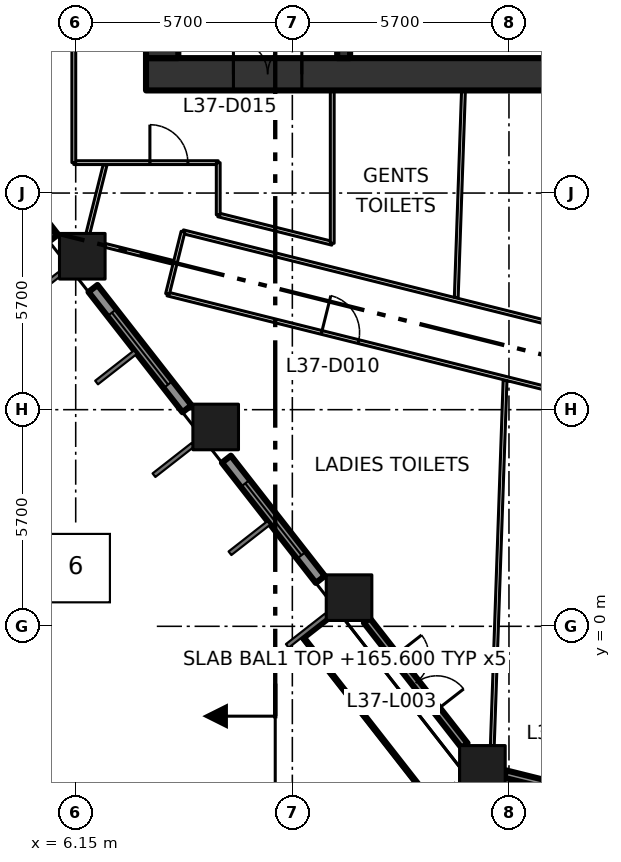
"""IFC4 building model, lengths in metres.
Left out: names, types, materials, properties, quantities, classifications, styles, units other than length and angle.
Written with IfcOpenShell. Run it as: python <this file> out.ifc"""

import sys

from ifc_helpers import new_model, si_unit, direction, frame, frame_2d, origin, origin_2d, place, context, subcontext, project, spatial, rectangle, extrude, element, fill, save


model = new_model("IFC4")
c1 = context("Model", 3, precision=1e-05, world=origin(), true_north=direction((0.0, 1.0)))
c2 = subcontext(c1, "Body", "Model", "MODEL_VIEW")
j1 = project(units=[si_unit("LENGTHUNIT", "METRE"), si_unit("PLANEANGLEUNIT", "RADIAN")], contexts=[c1])
p1 = place(None, origin())
s1 = spatial("IfcSite", under=j1, at=p1, CompositionType="ELEMENT")
p2 = place(p1, origin())
s2 = spatial("IfcBuilding", under=s1, at=p2, CompositionType="ELEMENT")
p3 = place(p2, frame((0.0, 0.0, 165.6)))
s3 = spatial("IfcBuildingStorey", under=s2, at=p3, CompositionType="ELEMENT", Elevation=165.6)
for number, where, z_axis, x_axis in (
    (1, (16.851, -3.738, 0.0), (0.0, 0.0, 1.0), (1.0, 0.0, 0.0)),
    (2, (13.342, 0.754, 0.0), (0.0, 0.0, 1.0), (1.0, 0.0, 0.0)),
    (3, (9.833, 5.245, 0.0), (0.0, 0.0, 1.0), (1.0, 0.0, 0.0)),
    (4, (6.323, 9.737, 0.0), (0.0, 0.0, 1.0), (1.0, 0.0, 0.0)),
):
    element("IfcColumn", number, at=place(p3, frame(where, z_axis=z_axis, x_axis=x_axis)), inside=s3, PredefinedType="COLUMN", context=c2, shape_type="SweptSolid", body=[
        extrude(rectangle(XDim=1.2, YDim=1.2, at=origin_2d()), origin(), (0.0, 0.0, 1.0), 4.2),
    ])
p4 = place(p3, frame((8.0, 14.525, -0.3), z_axis=(0.0, 0.0, 1.0), x_axis=(1.0, 0.0, 0.0)))
e5 = element("IfcWall", 5, at=p4, inside=s3, PredefinedType="SHEAR", context=c2, shape_type="SweptSolid", body=[
    extrude(rectangle(XDim=22.8, YDim=0.85, at=frame_2d((11.4, 0.0))), origin(), (0.0, 0.0, 1.0), 4.2),
])
p5 = place(p4, frame((2.3, 0.0, 0.3)))
e6 = element("IfcOpeningElement", 6, at=p5, cuts=e5, PredefinedType="OPENING", context=c2, shape_type="SweptSolid", body=[
    extrude(rectangle(XDim=1.8, YDim=2.1, at=frame_2d((0.9, 1.05))), frame((0.0, 0.435, 0.0), z_axis=(0.0, -1.0, 0.0), x_axis=(1.0, 0.0, 0.0)), (0.0, 0.0, 1.0), 0.87),
])
p6 = place(p3, frame((8.425, 14.95, -0.3), z_axis=(0.0, 0.0, 1.0), x_axis=(0.0, 1.0, 0.0)))
e7 = element("IfcWall", 7, at=p6, inside=s3, PredefinedType="SHEAR", context=c2, shape_type="SweptSolid", body=[
    extrude(rectangle(XDim=20.75, YDim=0.85, at=frame_2d((10.375, 0.0))), origin(), (0.0, 0.0, 1.0), 4.2),
])
p7 = place(p3, frame((13.2, 14.95, 0.0), z_axis=(0.0, 0.0, 1.0), x_axis=(0.0, 1.0, 0.0)))
e8 = element("IfcWall", 8, at=p7, inside=s3, PredefinedType="SHEAR", context=c2, shape_type="SweptSolid", body=[
    extrude(rectangle(XDim=20.75, YDim=0.34, at=frame_2d((10.375, 0.0))), origin(), (0.0, 0.0, 1.0), 3.9),
])
p8 = place(p7, frame((3.35, 0.0, 0.0)))
e9 = element("IfcOpeningElement", 9, at=p8, cuts=e8, PredefinedType="OPENING", context=c2, shape_type="SweptSolid", body=[
    extrude(rectangle(XDim=1.8, YDim=2.1, at=frame_2d((0.9, 1.05))), frame((0.0, 0.18, 0.0), z_axis=(0.0, -1.0, 0.0), x_axis=(1.0, 0.0, 0.0)), (0.0, 0.0, 1.0), 0.36),
])
p9 = place(p7, frame((11.45, 0.0, 0.0)))
e10 = element("IfcOpeningElement", 10, at=p9, cuts=e8, PredefinedType="OPENING", context=c2, shape_type="SweptSolid", body=[
    extrude(rectangle(XDim=1.2, YDim=2.1, at=frame_2d((0.6, 1.05))), frame((0.0, 0.18, 0.0), z_axis=(0.0, -1.0, 0.0), x_axis=(1.0, 0.0, 0.0)), (0.0, 0.0, 1.0), 0.36),
])
p10 = place(p3, frame((3.096, 13.381, 0.0), z_axis=(0.0, 0.0, 1.0), x_axis=(0.615563820493, -0.78808704018, 0.0)))
e11 = element("IfcWall", 11, at=p10, inside=s3, PredefinedType="SOLIDWALL", context=c2, shape_type="SweptSolid", body=[
    extrude(rectangle(XDim=4.016, YDim=0.3, at=frame_2d((2.008, 0.0))), origin(), (0.0, 0.0, 1.0), 3.15),
])
p11 = place(p10, frame((0.808, 0.0, 0.8)))
e12 = element("IfcOpeningElement", 12, at=p11, cuts=e11, PredefinedType="OPENING", context=c2, shape_type="SweptSolid", body=[
    extrude(rectangle(XDim=2.4, YDim=2.1, at=frame_2d((1.2, 1.05))), frame((0.0, 0.16, 0.0), z_axis=(0.0, -1.0, 0.0), x_axis=(1.0, 0.0, 0.0)), (0.0, 0.0, 1.0), 0.32),
])
p12 = place(p3, frame((6.605, 8.889, 0.0), z_axis=(0.0, 0.0, 1.0), x_axis=(0.615706559089, -0.787975528233, 0.0)))
e13 = element("IfcWall", 13, at=p12, inside=s3, PredefinedType="SOLIDWALL", context=c2, shape_type="SweptSolid", body=[
    extrude(rectangle(XDim=4.016, YDim=0.3, at=frame_2d((2.008, 0.0))), origin(), (0.0, 0.0, 1.0), 3.15),
])
p13 = place(p12, frame((0.808, 0.0, 0.8)))
e14 = element("IfcOpeningElement", 14, at=p13, cuts=e13, PredefinedType="OPENING", context=c2, shape_type="SweptSolid", body=[
    extrude(rectangle(XDim=2.4, YDim=2.1, at=frame_2d((1.2, 1.05))), frame((0.0, 0.16, 0.0), z_axis=(0.0, -1.0, 0.0), x_axis=(1.0, 0.0, 0.0)), (0.0, 0.0, 1.0), 0.32),
])
p14 = place(p3, frame((10.115, 4.397, 0.0), z_axis=(0.0, 0.0, 1.0), x_axis=(0.615644041972, -0.788024373725, 0.0)))
e15 = element("IfcWall", 15, at=p14, inside=s3, PredefinedType="SOLIDWALL", context=c2, shape_type="SweptSolid", body=[
    extrude(rectangle(XDim=4.015, YDim=0.3, at=frame_2d((2.008, 0.0))), origin(), (0.0, 0.0, 1.0), 3.15),
])
p15 = place(p14, frame((0.807, 0.0, 0.8)))
e16 = element("IfcOpeningElement", 16, at=p15, cuts=e15, PredefinedType="OPENING", context=c2, shape_type="SweptSolid", body=[
    extrude(rectangle(XDim=2.4, YDim=2.1, at=frame_2d((1.2, 1.05))), frame((0.0, 0.16, 0.0), z_axis=(0.0, -1.0, 0.0), x_axis=(1.0, 0.0, 0.0)), (0.0, 0.0, 1.0), 0.32),
])
p16 = place(p3, frame((13.811, 0.154, 0.0), z_axis=(0.0, 0.0, 1.0), x_axis=(0.615521537177, -0.788120065264, 0.0)))
e17 = element("IfcWall", 17, at=p16, inside=s3, PredefinedType="SOLIDWALL", context=c2, shape_type="SweptSolid", body=[
    extrude(rectangle(XDim=4.177, YDim=0.2, at=frame_2d((2.088, 0.0))), origin(), (0.0, 0.0, 1.0), 3.15),
])
p17 = place(p16, frame((1.188, 0.0, 0.0)))
e18 = element("IfcOpeningElement", 18, at=p17, cuts=e17, PredefinedType="OPENING", context=c2, shape_type="SweptSolid", body=[
    extrude(rectangle(XDim=1.8, YDim=2.9, at=frame_2d((0.9, 1.45))), frame((0.0, 0.11, 0.0), z_axis=(0.0, -1.0, 0.0), x_axis=(1.0, 0.0, 0.0)), (0.0, 0.0, 1.0), 0.22),
])
p18 = place(p3, frame((12.398, -0.199, 0.0), z_axis=(0.0, 0.0, 1.0), x_axis=(0.615638738903, -0.788028516719, 0.0)))
e19 = element("IfcWall", 19, at=p18, inside=s3, PredefinedType="SOLIDWALL", context=c2, shape_type="SweptSolid", body=[
    extrude(rectangle(XDim=5.36, YDim=0.4, at=frame_2d((2.68, 0.0))), origin(), (0.0, 0.0, 1.0), 0.3),
])
p19 = place(p3, frame((17.451, -3.888, 0.0), z_axis=(0.0, 0.0, 1.0), x_axis=(0.970335243139, -0.241763346938, 0.0)))
e20 = element("IfcWall", 20, at=p19, inside=s3, PredefinedType="SOLIDWALL", context=c2, shape_type="SweptSolid", body=[
    extrude(rectangle(XDim=4.463, YDim=0.2, at=frame_2d((2.232, 0.0))), origin(), (0.0, 0.0, 1.0), 3.15),
])
p20 = place(p19, frame((1.331, 0.0, 0.0)))
e21 = element("IfcOpeningElement", 21, at=p20, cuts=e20, PredefinedType="OPENING", context=c2, shape_type="SweptSolid", body=[
    extrude(rectangle(XDim=1.8, YDim=2.9, at=frame_2d((0.9, 1.45))), frame((0.0, 0.11, 0.0), z_axis=(0.0, -1.0, 0.0), x_axis=(1.0, 0.0, 0.0)), (0.0, 0.0, 1.0), 0.22),
])
p21 = place(p3, frame((6.1, 12.2, 0.0), z_axis=(0.0, 0.0, 1.0), x_axis=(1.0, 0.0, 0.0)))
e22 = element("IfcWall", 22, at=p21, inside=s3, PredefinedType="PARTITIONING", context=c2, shape_type="SweptSolid", body=[
    extrude(rectangle(XDim=3.8, YDim=0.1, at=frame_2d((1.9, 0.0))), origin(), (0.0, 0.0, 1.0), 3.9),
])
p22 = place(p21, frame((2.002, 0.0, 0.0)))
e23 = element("IfcOpeningElement", 23, at=p22, cuts=e22, PredefinedType="OPENING", context=c2, shape_type="SweptSolid", body=[
    extrude(rectangle(XDim=1.0, YDim=2.1, at=frame_2d((0.5, 1.05))), frame((0.0, 0.06, 0.0), z_axis=(0.0, -1.0, 0.0), x_axis=(1.0, 0.0, 0.0)), (0.0, 0.0, 1.0), 0.12),
])
p23 = place(p3, frame((6.1, 38.9, 0.0), z_axis=(0.0, 0.0, 1.0), x_axis=(0.0, -1.0, 0.0)))
e24 = element("IfcWall", 24, at=p23, inside=s3, PredefinedType="PARTITIONING", context=c2, shape_type="SweptSolid", body=[
    extrude(rectangle(XDim=26.7, YDim=0.1, at=frame_2d((13.35, 0.0))), origin(), (0.0, 0.0, 1.0), 3.9),
])
p24 = place(p23, frame((20.61, 0.0, 0.0)))
e25 = element("IfcOpeningElement", 25, at=p24, cuts=e24, PredefinedType="OPENING", context=c2, shape_type="SweptSolid", body=[
    extrude(rectangle(XDim=1.0, YDim=2.1, at=frame_2d((0.5, 1.05))), frame((0.0, 0.06, 0.0), z_axis=(0.0, -1.0, 0.0), x_axis=(1.0, 0.0, 0.0)), (0.0, 0.0, 1.0), 0.12),
])
p25 = place(p23, frame((7.18, 0.0, 0.0)))
e26 = element("IfcOpeningElement", 26, at=p25, cuts=e24, PredefinedType="OPENING", context=c2, shape_type="SweptSolid", body=[
    extrude(rectangle(XDim=1.8, YDim=2.1, at=frame_2d((0.9, 1.05))), frame((0.0, 0.06, 0.0), z_axis=(0.0, -1.0, 0.0), x_axis=(1.0, 0.0, 0.0)), (0.0, 0.0, 1.0), 0.12),
])
p26 = place(p3, frame((8.565, 8.744, 0.0), z_axis=(0.0, 0.0, 1.0), x_axis=(0.970296742948, -0.241917817915, 0.0)))
e27 = element("IfcWall", 27, at=p26, inside=s3, PredefinedType="PARTITIONING", context=c2, shape_type="SweptSolid", body=[
    extrude(rectangle(XDim=57.374, YDim=0.1, at=frame_2d((28.687, 0.0))), origin(), (0.0, 0.0, 1.0), 3.9),
])
p27 = place(p26, frame((46.936, 0.0, 0.0)))
e28 = element("IfcOpeningElement", 28, at=p27, cuts=e27, PredefinedType="OPENING", context=c2, shape_type="SweptSolid", body=[
    extrude(rectangle(XDim=1.0, YDim=2.1, at=frame_2d((0.5, 1.05))), frame((0.0, 0.06, 0.0), z_axis=(0.0, -1.0, 0.0), x_axis=(1.0, 0.0, 0.0)), (0.0, 0.0, 1.0), 0.12),
])
p28 = place(p26, frame((13.936, 0.0, 0.0)))
e29 = element("IfcOpeningElement", 29, at=p28, cuts=e27, PredefinedType="OPENING", context=c2, shape_type="SweptSolid", body=[
    extrude(rectangle(XDim=1.0, YDim=2.1, at=frame_2d((0.5, 1.05))), frame((0.0, 0.06, 0.0), z_axis=(0.0, -1.0, 0.0), x_axis=(1.0, 0.0, 0.0)), (0.0, 0.0, 1.0), 0.12),
])
p29 = place(p26, frame((18.736, 0.0, 0.0)))
e30 = element("IfcOpeningElement", 30, at=p29, cuts=e27, PredefinedType="OPENING", context=c2, shape_type="SweptSolid", body=[
    extrude(rectangle(XDim=1.8, YDim=2.1, at=frame_2d((0.9, 1.05))), frame((0.0, 0.06, 0.0), z_axis=(0.0, -1.0, 0.0), x_axis=(1.0, 0.0, 0.0)), (0.0, 0.0, 1.0), 0.12),
])
p30 = place(p26, frame((31.036, 0.0, 0.0)))
e31 = element("IfcOpeningElement", 31, at=p30, cuts=e27, PredefinedType="OPENING", context=c2, shape_type="SweptSolid", body=[
    extrude(rectangle(XDim=1.8, YDim=2.1, at=frame_2d((0.9, 1.05))), frame((0.0, 0.06, 0.0), z_axis=(0.0, -1.0, 0.0), x_axis=(1.0, 0.0, 0.0)), (0.0, 0.0, 1.0), 0.12),
])
p31 = place(p26, frame((4.18, 0.0, 0.0)))
e32 = element("IfcOpeningElement", 32, at=p31, cuts=e27, PredefinedType="OPENING", context=c2, shape_type="SweptSolid", body=[
    extrude(rectangle(XDim=1.0, YDim=2.1, at=frame_2d((0.5, 1.05))), frame((0.0, 0.06, 0.0), z_axis=(0.0, -1.0, 0.0), x_axis=(1.0, 0.0, 0.0)), (0.0, 0.0, 1.0), 0.12),
])
p32 = place(p3, frame((8.973, 10.382, 0.0), z_axis=(0.0, 0.0, 1.0), x_axis=(0.970286808807, -0.241957658808, 0.0)))
e33 = element("IfcWall", 33, at=p32, inside=s3, PredefinedType="PARTITIONING", context=c2, shape_type="SweptSolid", body=[
    extrude(rectangle(XDim=19.88, YDim=0.1, at=frame_2d((9.94, 0.0))), origin(), (0.0, 0.0, 1.0), 3.9),
])
p33 = place(p32, frame((12.575, 0.0, 0.0)))
e34 = element("IfcOpeningElement", 34, at=p33, cuts=e33, PredefinedType="OPENING", context=c2, shape_type="SweptSolid", body=[
    extrude(rectangle(XDim=1.8, YDim=2.1, at=frame_2d((0.9, 1.05))), frame((0.0, 0.06, 0.0), z_axis=(0.0, -1.0, 0.0), x_axis=(1.0, 0.0, 0.0)), (0.0, 0.0, 1.0), 0.12),
])
p34 = place(p3, frame((8.973, 10.382, 0.0), z_axis=(0.0, 0.0, 1.0), x_axis=(-0.241650823739, -0.970363271866, 0.0)))
e35 = element("IfcWall", 35, at=p34, inside=s3, PredefinedType="PARTITIONING", context=c2, shape_type="SweptSolid", body=[
    extrude(rectangle(XDim=1.688, YDim=0.1, at=frame_2d((0.844, 0.0))), origin(), (0.0, 0.0, 1.0), 3.9),
])
p35 = place(p3, frame((9.9, 10.826, 0.0), z_axis=(0.0, 0.0, 1.0), x_axis=(0.970290953223, -0.241941038466, 0.0)))
e36 = element("IfcWall", 36, at=p35, inside=s3, PredefinedType="PARTITIONING", context=c2, shape_type="SweptSolid", body=[
    extrude(rectangle(XDim=3.092, YDim=0.1, at=frame_2d((1.546, 0.0))), origin(), (0.0, 0.0, 1.0), 3.9),
])
p36 = place(p3, frame((9.9, 12.2, 0.0), z_axis=(0.0, 0.0, 1.0), x_axis=(0.0, -1.0, 0.0)))
e37 = element("IfcWall", 37, at=p36, inside=s3, PredefinedType="PARTITIONING", context=c2, shape_type="SweptSolid", body=[
    extrude(rectangle(XDim=1.374, YDim=0.1, at=frame_2d((0.687, 0.0))), origin(), (0.0, 0.0, 1.0), 3.9),
])
p37 = place(p3, frame((12.9, 10.078, 0.0), z_axis=(0.0, 0.0, 1.0), x_axis=(0.0, 1.0, 0.0)))
e38 = element("IfcWall", 38, at=p37, inside=s3, PredefinedType="PARTITIONING", context=c2, shape_type="SweptSolid", body=[
    extrude(rectangle(XDim=4.022, YDim=0.1, at=frame_2d((2.011, 0.0))), origin(), (0.0, 0.0, 1.0), 3.9),
])
p38 = place(p3, frame((6.922, 12.138, 0.0), z_axis=(0.0, 0.0, 1.0), x_axis=(-0.242504681353, -0.970150235542, 0.0)))
e39 = element("IfcWall", 39, at=p38, inside=s3, PredefinedType="PARTITIONING", context=c2, shape_type="SweptSolid", body=[
    extrude(rectangle(XDim=1.856, YDim=0.1, at=frame_2d((0.928, 0.0))), origin(), (0.0, 0.0, 1.0), 3.9),
])
p39 = place(p3, frame((8.72, 9.574, 0.0), z_axis=(0.0, 0.0, 1.0), x_axis=(-0.97017350799, 0.242411559945, 0.0)))
e40 = element("IfcWall", 40, at=p39, inside=s3, PredefinedType="PARTITIONING", context=c2, shape_type="SweptSolid", body=[
    extrude(rectangle(XDim=1.852, YDim=0.1, at=frame_2d((0.926, 0.0))), origin(), (0.0, 0.0, 1.0), 3.9),
])
p40 = place(p3, frame((16.163, 8.652, 0.0), z_axis=(0.0, 0.0, 1.0), x_axis=(0.034843270883, 0.999392788884, 0.0)))
e41 = element("IfcWall", 41, at=p40, inside=s3, PredefinedType="PARTITIONING", context=c2, shape_type="SweptSolid", body=[
    extrude(rectangle(XDim=5.451, YDim=0.1, at=frame_2d((2.726, 0.0))), origin(), (0.0, 0.0, 1.0), 3.9),
])
p41 = place(p3, frame((17.112, -3.138, 0.0), z_axis=(0.0, 0.0, 1.0), x_axis=(0.034852485017, 0.999392467596, 0.0)))
e42 = element("IfcWall", 42, at=p41, inside=s3, PredefinedType="PARTITIONING", context=c2, shape_type="SweptSolid", body=[
    extrude(rectangle(XDim=9.611, YDim=0.1, at=frame_2d((4.805, 0.0))), origin(), (0.0, 0.0, 1.0), 3.9),
])
p42 = place(p5, origin())
e43 = element("IfcDoor", 43, at=p42, inside=s3, OperationType="DOUBLE_DOOR_SINGLE_SWING", PredefinedType="DOOR", context=c2, shape_type="SweptSolid", body=[
    extrude(rectangle(XDim=1.8, YDim=2.1, at=frame_2d((0.9, 1.05))), frame((0.0, 0.025, 0.0), z_axis=(0.0, -1.0, 0.0), x_axis=(1.0, 0.0, 0.0)), (0.0, 0.0, 1.0), 0.05),
])
fill(e6, e43)
p43 = place(p13, origin())
e44 = element("IfcWindow", 44, at=p43, inside=s3, PartitioningType="DOUBLE_PANEL_VERTICAL", PredefinedType="WINDOW", context=c2, shape_type="SweptSolid", body=[
    extrude(rectangle(XDim=2.4, YDim=2.1, at=frame_2d((1.2, 1.05))), frame((0.0, 0.03, 0.0), z_axis=(0.0, -1.0, 0.0), x_axis=(1.0, 0.0, 0.0)), (0.0, 0.0, 1.0), 0.06),
])
fill(e14, e44)
p44 = place(p15, origin())
e45 = element("IfcWindow", 45, at=p44, inside=s3, PartitioningType="DOUBLE_PANEL_VERTICAL", PredefinedType="WINDOW", context=c2, shape_type="SweptSolid", body=[
    extrude(rectangle(XDim=2.4, YDim=2.1, at=frame_2d((1.2, 1.05))), frame((0.0, 0.03, 0.0), z_axis=(0.0, -1.0, 0.0), x_axis=(1.0, 0.0, 0.0)), (0.0, 0.0, 1.0), 0.06),
])
fill(e16, e45)
p45 = place(p17, origin())
e46 = element("IfcDoor", 46, at=p45, inside=s3, OperationType="DOUBLE_DOOR_SINGLE_SWING", PredefinedType="DOOR", context=c2, shape_type="SweptSolid", body=[
    extrude(rectangle(XDim=1.8, YDim=2.9, at=frame_2d((0.9, 1.45))), frame((0.0, 0.025, 0.0), z_axis=(0.0, -1.0, 0.0), x_axis=(1.0, 0.0, 0.0)), (0.0, 0.0, 1.0), 0.05),
])
fill(e18, e46)
p46 = place(p31, origin())
e47 = element("IfcDoor", 47, at=p46, inside=s3, OperationType="SINGLE_SWING_LEFT", PredefinedType="DOOR", context=c2, shape_type="SweptSolid", body=[
    extrude(rectangle(XDim=1.0, YDim=2.1, at=frame_2d((0.5, 1.05))), frame((0.0, 0.025, 0.0), z_axis=(0.0, -1.0, 0.0), x_axis=(1.0, 0.0, 0.0)), (0.0, 0.0, 1.0), 0.05),
])
fill(e32, e47)
p47 = place(p22, origin())
e48 = element("IfcDoor", 48, at=p47, inside=s3, OperationType="SINGLE_SWING_LEFT", PredefinedType="DOOR", context=c2, shape_type="SweptSolid", body=[
    extrude(rectangle(XDim=1.0, YDim=2.1, at=frame_2d((0.5, 1.05))), frame((0.0, 0.025, 0.0), z_axis=(0.0, -1.0, 0.0), x_axis=(1.0, 0.0, 0.0)), (0.0, 0.0, 1.0), 0.05),
])
fill(e23, e48)
save(model, sys.argv[1])
